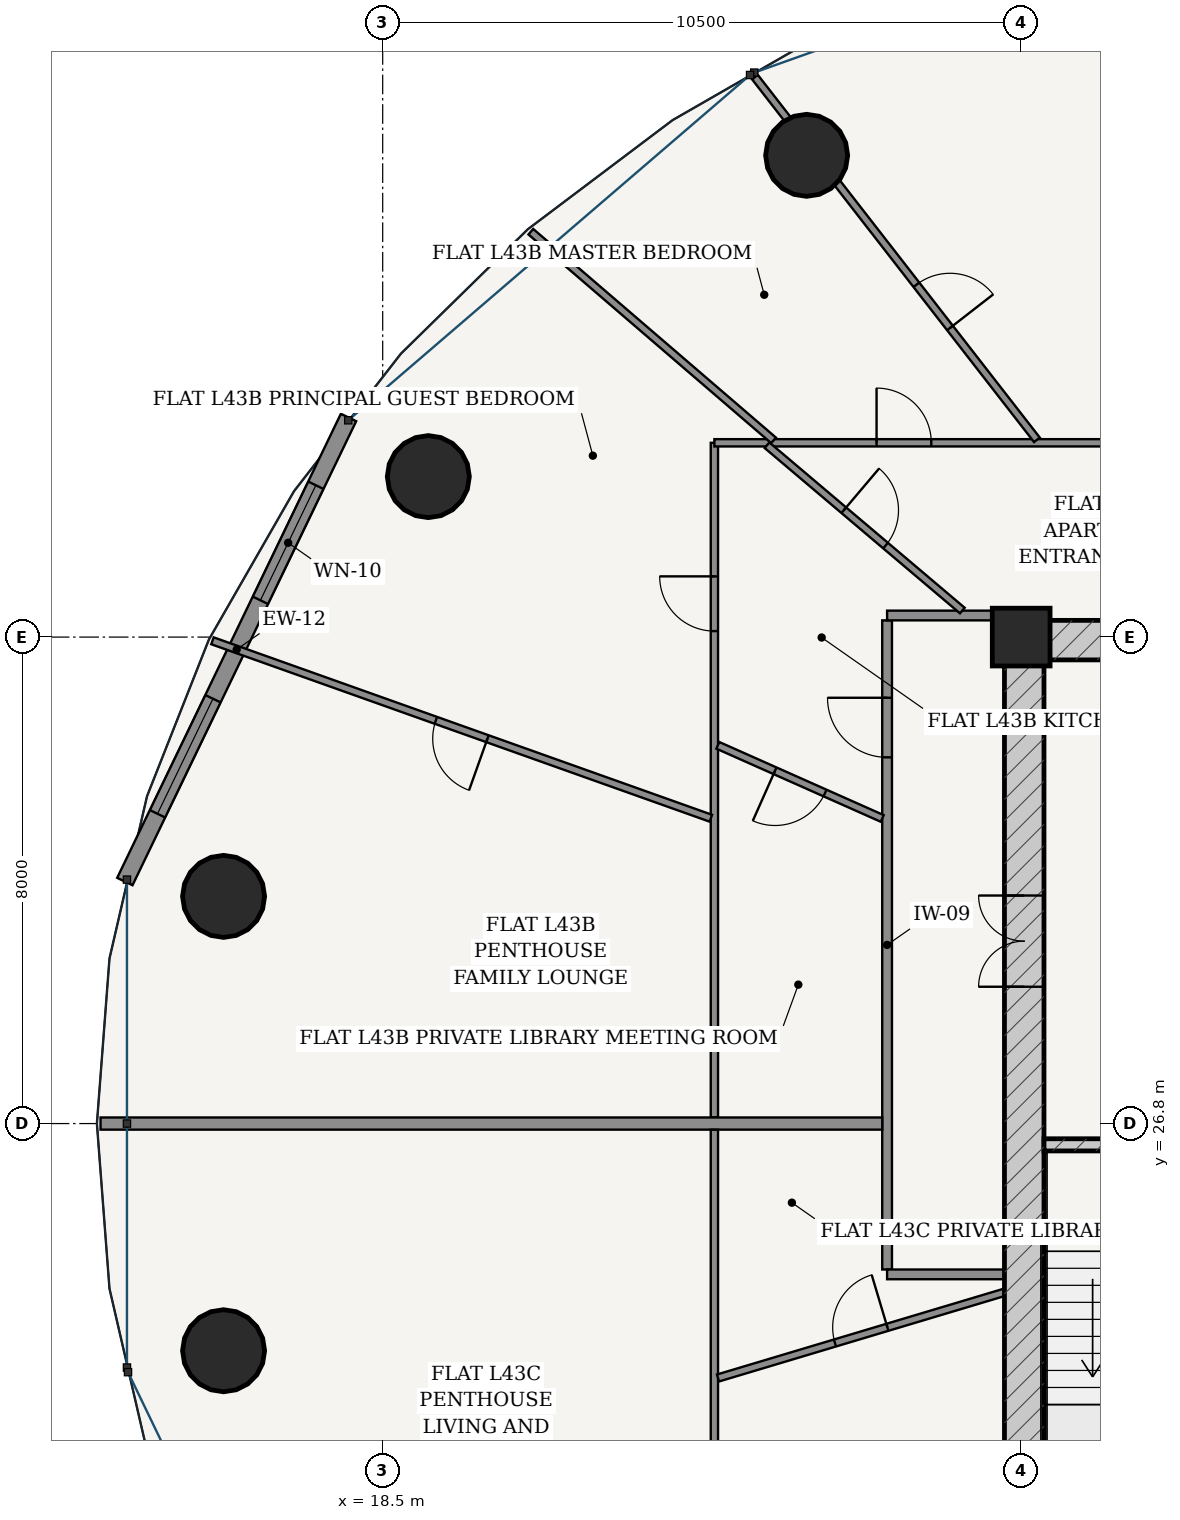
"""IFC4 building model, lengths in metres.
Left out: names, types, materials, properties, quantities, classifications, styles, units other than length and angle.
Written with IfcOpenShell. Run it as: python <this file> out.ifc"""

import sys

from ifc_helpers import new_model, si_unit, direction, frame, frame_2d, origin, origin_2d, place, context, subcontext, project, spatial, rectangle, hollow_circle, extrude, source, transform, mapped, element, fill, save


model = new_model("IFC4")
c1 = context("Model", 3, precision=1e-05, world=origin(), true_north=direction((-0.2419218956, 0.970295726276)))
c2 = subcontext(c1, "Body", "Model", "MODEL_VIEW")
j1 = project(units=[si_unit("LENGTHUNIT", "METRE"), si_unit("PLANEANGLEUNIT", "RADIAN")], contexts=[c1])
p1 = place(None, origin())
s1 = spatial("IfcSite", under=j1, at=p1, CompositionType="ELEMENT")
p2 = place(p1, origin())
s2 = spatial("IfcBuilding", under=s1, at=p2, CompositionType="ELEMENT")
p3 = place(p2, frame((0.0, 0.0, 164.2)))
s3 = spatial("IfcBuildingStorey", under=s2, at=p3, CompositionType="ELEMENT", Elevation=164.2)
p4 = place(p3, frame((29.0, 34.8, 0.0), z_axis=(0.0, 0.0, 1.0), x_axis=(1.0, 0.0, 0.0)))
e1 = element("IfcColumn", 1, at=p4, inside=s3, PredefinedType="COLUMN", context=c2, shape_type="SweptSolid", body=[
    extrude(rectangle(XDim=0.95, YDim=0.95, at=origin_2d()), origin(), (0.0, 0.0, 1.0), 3.6),
])
p5 = place(p3, frame((28.725, 34.75, 0.0), z_axis=(0.0, 0.0, 1.0), x_axis=(1.0, 0.0, 0.0)))
e2 = element("IfcWall", 2, at=p5, inside=s3, PredefinedType="SHEAR", context=c2, shape_type="SweptSolid", body=[
    extrude(rectangle(XDim=18.55, YDim=0.65, at=frame_2d((9.275, 0.0))), origin(), (0.0, 0.0, 1.0), 3.33),
])
p6 = place(p3, frame((29.05, 19.175, 0.0), z_axis=(0.0, 0.0, 1.0), x_axis=(0.0, 1.0, 0.0)))
e3 = element("IfcWall", 3, at=p6, inside=s3, PredefinedType="SHEAR", context=c2, shape_type="SweptSolid", body=[
    extrude(rectangle(XDim=15.25, YDim=0.65, at=frame_2d((7.625, 0.0))), origin(), (0.0, 0.0, 1.0), 3.33),
])
p7 = place(p6, frame((9.875, 0.0, 0.0)))
e4 = element("IfcOpeningElement", 4, at=p7, cuts=e3, PredefinedType="OPENING", context=c2, shape_type="SweptSolid", body=[
    extrude(rectangle(XDim=1.5, YDim=2.2, at=frame_2d((0.75, 1.1))), frame((0.0, 0.335, 0.0), z_axis=(0.0, -1.0, 0.0), x_axis=(1.0, 0.0, 0.0)), (0.0, 0.0, 1.0), 0.67),
])
p8 = place(p3, frame((29.375, 26.45, 0.0), z_axis=(0.0, 0.0, 1.0), x_axis=(1.0, 0.0, 0.0)))
e5 = element("IfcWall", 5, at=p8, inside=s3, PredefinedType="SOLIDWALL", context=c2, shape_type="SweptSolid", body=[
    extrude(rectangle(XDim=3.32, YDim=0.2, at=frame_2d((1.66, 0.0))), origin(), (0.0, 0.0, 1.0), 3.33),
])
p9 = place(p8, frame((1.185, 0.0, 0.0)))
e6 = element("IfcOpeningElement", 6, at=p9, cuts=e5, PredefinedType="OPENING", context=c2, shape_type="SweptSolid", body=[
    extrude(rectangle(XDim=0.95, YDim=2.15, at=frame_2d((0.475, 1.075))), frame((0.0, 0.11, 0.0), z_axis=(0.0, -1.0, 0.0), x_axis=(1.0, 0.0, 0.0)), (0.0, 0.0, 1.0), 0.22),
])
for number, where, z_axis, x_axis in (
    (7, (25.472, 42.723, 0.0), (0.0, 0.0, 1.0), (1.0, 0.0, 0.0)),
    (8, (19.25, 37.439, 0.0), (0.0, 0.0, 1.0), (1.0, 0.0, 0.0)),
    (9, (15.883, 30.536, 0.0), (0.0, 0.0, 1.0), (1.0, 0.0, 0.0)),
    (10, (15.883, 23.064, 0.0), (0.0, 0.0, 1.0), (1.0, 0.0, 0.0)),
):
    element("IfcColumn", number, at=place(p3, frame(where, z_axis=z_axis, x_axis=x_axis)), inside=s3, PredefinedType="COLUMN", context=c2, shape_type="SweptSolid", body=[
        extrude(hollow_circle(Radius=0.675, WallThickness=0.042, at=origin_2d()), origin(), (0.0, 0.0, 1.0), 3.6),
    ])
p10 = place(p3, frame((17.938, 38.411, 0.0), z_axis=(0.0, 0.0, 1.0), x_axis=(-0.434209827226, -0.900811759437, 0.0)))
e11 = element("IfcWall", 11, at=p10, inside=s3, PredefinedType="SOLIDWALL", context=c2, shape_type="SweptSolid", body=[
    extrude(rectangle(XDim=8.472, YDim=0.28, at=frame_2d((4.236, 0.0))), origin(), (0.0, 0.0, 1.0), 3.33),
])
p11 = place(p10, frame((1.237, 0.0, 0.85)))
e12 = element("IfcOpeningElement", 12, at=p11, cuts=e11, PredefinedType="OPENING", context=c2, shape_type="SweptSolid", body=[
    extrude(rectangle(XDim=2.1, YDim=1.95, at=frame_2d((1.05, 0.975))), frame((0.0, 0.15, 0.0), z_axis=(0.0, -1.0, 0.0), x_axis=(1.0, 0.0, 0.0)), (0.0, 0.0, 1.0), 0.3),
])
p12 = place(p10, frame((5.134, 0.0, 0.85)))
e13 = element("IfcOpeningElement", 13, at=p12, cuts=e11, PredefinedType="OPENING", context=c2, shape_type="SweptSolid", body=[
    extrude(rectangle(XDim=2.1, YDim=1.95, at=frame_2d((1.05, 0.975))), frame((0.0, 0.15, 0.0), z_axis=(0.0, -1.0, 0.0), x_axis=(1.0, 0.0, 0.0)), (0.0, 0.0, 1.0), 0.3),
])
p13 = place(p3, frame((26.795, 24.4, 0.0), z_axis=(0.0, 0.0, 1.0), x_axis=(0.0, 1.0, 0.0)))
e14 = element("IfcWall", 14, at=p13, inside=s3, PredefinedType="PARTITIONING", context=c2, shape_type="SweptSolid", body=[
    extrude(rectangle(XDim=10.675, YDim=0.16, at=frame_2d((5.337, 0.0))), origin(), (0.0, 0.0, 1.0), 2.776),
])
p14 = place(p13, frame((8.422, 0.0, 0.0)))
e15 = element("IfcOpeningElement", 15, at=p14, cuts=e14, PredefinedType="OPENING", context=c2, shape_type="SweptSolid", body=[
    extrude(rectangle(XDim=0.98, YDim=2.2, at=frame_2d((0.49, 1.1))), frame((0.0, 0.09, 0.0), z_axis=(0.0, -1.0, 0.0), x_axis=(1.0, 0.0, 0.0)), (0.0, 0.0, 1.0), 0.18),
])
p15 = place(p3, frame((26.795, 35.155, 0.0), z_axis=(0.0, 0.0, 1.0), x_axis=(1.0, 0.0, 0.0)))
e16 = element("IfcWall", 16, at=p15, inside=s3, PredefinedType="PARTITIONING", context=c2, shape_type="SweptSolid", body=[
    extrude(rectangle(XDim=1.93, YDim=0.16, at=frame_2d((0.965, 0.0))), origin(), (0.0, 0.0, 1.0), 2.776),
])
p16 = place(p3, frame((26.795, 24.32, 0.0), z_axis=(0.0, 0.0, 1.0), x_axis=(1.0, 0.0, 0.0)))
e17 = element("IfcWall", 17, at=p16, inside=s3, PredefinedType="PARTITIONING", context=c2, shape_type="SweptSolid", body=[
    extrude(rectangle(XDim=1.93, YDim=0.16, at=frame_2d((0.965, 0.0))), origin(), (0.0, 0.0, 1.0), 3.33),
])
p17 = place(p3, frame((23.955, 26.902, 0.0), z_axis=(0.0, 0.0, 1.0), x_axis=(0.0, 1.0, 0.0)))
e18 = element("IfcWall", 18, at=p17, inside=s3, PredefinedType="PARTITIONING", context=c2, shape_type="SweptSolid", body=[
    extrude(rectangle(XDim=11.093, YDim=0.12, at=frame_2d((5.546, 0.0))), origin(), (0.0, 0.0, 1.0), 2.776),
])
p18 = place(p17, frame((7.997, 0.0, 0.0)))
e19 = element("IfcOpeningElement", 19, at=p18, cuts=e18, PredefinedType="OPENING", context=c2, shape_type="SweptSolid", body=[
    extrude(rectangle(XDim=0.9, YDim=2.15, at=frame_2d((0.45, 1.075))), frame((0.0, 0.07, 0.0), z_axis=(0.0, -1.0, 0.0), x_axis=(1.0, 0.0, 0.0)), (0.0, 0.0, 1.0), 0.14),
])
p19 = place(p3, frame((23.955, 37.995, 0.0), z_axis=(0.0, 0.0, 1.0), x_axis=(1.0, 0.0, 0.0)))
e20 = element("IfcWall", 20, at=p19, inside=s3, PredefinedType="PARTITIONING", context=c2, shape_type="SweptSolid", body=[
    extrude(rectangle(XDim=7.69, YDim=0.12, at=frame_2d((3.845, 0.0))), origin(), (0.0, 0.0, 1.0), 2.776),
])
p20 = place(p19, frame((2.667, 0.0, 0.0)))
e21 = element("IfcOpeningElement", 21, at=p20, cuts=e20, PredefinedType="OPENING", context=c2, shape_type="SweptSolid", body=[
    extrude(rectangle(XDim=0.9, YDim=2.15, at=frame_2d((0.45, 1.075))), frame((0.0, 0.07, 0.0), z_axis=(0.0, -1.0, 0.0), x_axis=(1.0, 0.0, 0.0)), (0.0, 0.0, 1.0), 0.14),
])
p21 = place(p3, frame((29.259, 38.044, 0.0), z_axis=(0.0, 0.0, 1.0), x_axis=(-0.613770587295, 0.789484430607, 0.0)))
e22 = element("IfcWall", 22, at=p21, inside=s3, PredefinedType="PARTITIONING", context=c2, shape_type="SweptSolid", body=[
    extrude(rectangle(XDim=7.556, YDim=0.12, at=frame_2d((3.778, 0.0))), origin(), (0.0, 0.0, 1.0), 2.776),
])
p22 = place(p21, frame((2.33, 0.0, 0.0)))
e23 = element("IfcOpeningElement", 23, at=p22, cuts=e22, PredefinedType="OPENING", context=c2, shape_type="SweptSolid", body=[
    extrude(rectangle(XDim=0.9, YDim=2.15, at=frame_2d((0.45, 1.075))), frame((0.0, 0.07, 0.0), z_axis=(0.0, -1.0, 0.0), x_axis=(1.0, 0.0, 0.0)), (0.0, 0.0, 1.0), 0.14),
])
p23 = place(p3, frame((24.928, 38.035, 0.0), z_axis=(0.0, 0.0, 1.0), x_axis=(-0.758368609512, 0.65182593697, 0.0)))
e24 = element("IfcWall", 24, at=p23, inside=s3, PredefinedType="PARTITIONING", context=c2, shape_type="SweptSolid", body=[
    extrude(rectangle(XDim=5.263, YDim=0.12, at=frame_2d((2.632, 0.0))), origin(), (0.0, 0.0, 1.0), 2.846),
])
p24 = place(p3, frame((23.896, 31.821, 0.0), z_axis=(0.0, 0.0, 1.0), x_axis=(-0.942072876428, 0.335408251983, 0.0)))
e25 = element("IfcWall", 25, at=p24, inside=s3, PredefinedType="PARTITIONING", context=c2, shape_type="SweptSolid", body=[
    extrude(rectangle(XDim=8.7, YDim=0.12, at=frame_2d((4.35, 0.0))), origin(), (0.0, 0.0, 1.0), 2.846),
])
p25 = place(p24, frame((3.9, 0.0, 0.0)))
e26 = element("IfcOpeningElement", 26, at=p25, cuts=e25, PredefinedType="OPENING", context=c2, shape_type="SweptSolid", body=[
    extrude(rectangle(XDim=0.9, YDim=2.15, at=frame_2d((0.45, 1.075))), frame((0.0, 0.07, 0.0), z_axis=(0.0, -1.0, 0.0), x_axis=(1.0, 0.0, 0.0)), (0.0, 0.0, 1.0), 0.14),
])
p26 = place(p3, frame((28.032, 35.236, 0.0), z_axis=(0.0, 0.0, 1.0), x_axis=(-0.763324664245, 0.646015059388, 0.0)))
e27 = element("IfcWall", 27, at=p26, inside=s3, PredefinedType="PARTITIONING", context=c2, shape_type="SweptSolid", body=[
    extrude(rectangle(XDim=4.208, YDim=0.12, at=frame_2d((2.104, 0.0))), origin(), (0.0, 0.0, 1.0), 3.005),
])
p27 = place(p26, frame((1.654, 0.0, 0.0)))
e28 = element("IfcOpeningElement", 28, at=p27, cuts=e27, PredefinedType="OPENING", context=c2, shape_type="SweptSolid", body=[
    extrude(rectangle(XDim=0.9, YDim=2.15, at=frame_2d((0.45, 1.075))), frame((0.0, 0.07, 0.0), z_axis=(0.0, -1.0, 0.0), x_axis=(1.0, 0.0, 0.0)), (0.0, 0.0, 1.0), 0.14),
])
p28 = place(p3, frame((26.715, 31.818, 0.0), z_axis=(0.0, 0.0, 1.0), x_axis=(-0.91376049718, 0.406253312347, 0.0)))
e29 = element("IfcWall", 29, at=p28, inside=s3, PredefinedType="PARTITIONING", context=c2, shape_type="SweptSolid", body=[
    extrude(rectangle(XDim=2.958, YDim=0.12, at=frame_2d((1.479, 0.0))), origin(), (0.0, 0.0, 1.0), 3.33),
])
p29 = place(p28, frame((1.029, 0.0, 0.0)))
e30 = element("IfcOpeningElement", 30, at=p29, cuts=e29, PredefinedType="OPENING", context=c2, shape_type="SweptSolid", body=[
    extrude(rectangle(XDim=0.9, YDim=2.15, at=frame_2d((0.45, 1.075))), frame((0.0, 0.07, 0.0), z_axis=(0.0, -1.0, 0.0), x_axis=(1.0, 0.0, 0.0)), (0.0, 0.0, 1.0), 0.14),
])
p30 = place(p3, frame((26.715, 26.8, 0.0), z_axis=(0.0, 0.0, 1.0), x_axis=(-1.0, 0.0, 0.0)))
e31 = element("IfcWall", 31, at=p30, inside=s3, PredefinedType="PARTITIONING", context=c2, shape_type="SweptSolid", body=[
    extrude(rectangle(XDim=12.855, YDim=0.2, at=frame_2d((6.427, 0.0))), origin(), (0.0, 0.0, 1.0), 2.846),
])
p31 = place(p3, frame((23.955, 21.48, 0.0), z_axis=(0.0, 0.0, 1.0), x_axis=(0.0, 1.0, 0.0)))
e32 = element("IfcWall", 32, at=p31, inside=s3, PredefinedType="PARTITIONING", context=c2, shape_type="SweptSolid", body=[
    extrude(rectangle(XDim=5.218, YDim=0.12, at=frame_2d((2.609, 0.0))), origin(), (0.0, 0.0, 1.0), 2.776),
])
p32 = place(p3, frame((28.723, 24.025, 0.0), z_axis=(0.0, 0.0, 1.0), x_axis=(-0.958046115523, -0.286614096882, 0.0)))
e33 = element("IfcWall", 33, at=p32, inside=s3, PredefinedType="PARTITIONING", context=c2, shape_type="SweptSolid", body=[
    extrude(rectangle(XDim=4.915, YDim=0.12, at=frame_2d((2.458, 0.0))), origin(), (0.0, 0.0, 1.0), 3.33),
])
p33 = place(p32, frame((2.007, 0.0, 0.0)))
e34 = element("IfcOpeningElement", 34, at=p33, cuts=e33, PredefinedType="OPENING", context=c2, shape_type="SweptSolid", body=[
    extrude(rectangle(XDim=0.9, YDim=2.15, at=frame_2d((0.45, 1.075))), frame((0.0, 0.07, 0.0), z_axis=(0.0, -1.0, 0.0), x_axis=(1.0, 0.0, 0.0)), (0.0, 0.0, 1.0), 0.14),
])
m1 = source(origin(), c2, "Body", "SweptSolid", [
    extrude(rectangle(XDim=2.1, YDim=1.95, at=frame_2d((1.05, 0.975))), frame((0.0, 0.03, 0.0), z_axis=(0.0, -1.0, 0.0), x_axis=(1.0, 0.0, 0.0)), (0.0, 0.0, 1.0), 0.06),
])
p34 = place(p11, origin())
e35 = element("IfcWindow", 35, at=p34, inside=s3, PartitioningType="SINGLE_PANEL", PredefinedType="WINDOW", context=c2, shape_type="MappedRepresentation", body=[
    mapped(m1, transform((0.0, 0.0, 0.0), scale=1.0)),
])
fill(e12, e35)
p35 = place(p12, origin())
e36 = element("IfcWindow", 36, at=p35, inside=s3, PartitioningType="SINGLE_PANEL", PredefinedType="WINDOW", context=c2, shape_type="MappedRepresentation", body=[
    mapped(m1, transform((0.0, 0.0, 0.0), scale=1.0)),
])
fill(e13, e36)
m2 = source(origin(), c2, "Body", "SweptSolid", [
    extrude(rectangle(XDim=1.5, YDim=2.2, at=frame_2d((0.75, 1.1))), frame((0.0, 0.025, 0.0), z_axis=(0.0, -1.0, 0.0), x_axis=(1.0, 0.0, 0.0)), (0.0, 0.0, 1.0), 0.05),
])
p36 = place(p7, origin())
e37 = element("IfcDoor", 37, at=p36, inside=s3, OperationType="DOUBLE_DOOR_SINGLE_SWING", PredefinedType="DOOR", context=c2, shape_type="MappedRepresentation", body=[
    mapped(m2, transform((0.0, 0.0, 0.0), scale=1.0)),
])
fill(e4, e37)
m3 = source(origin(), c2, "Body", "SweptSolid", [
    extrude(rectangle(XDim=0.98, YDim=2.2, at=frame_2d((0.49, 1.1))), frame((0.0, 0.025, 0.0), z_axis=(0.0, -1.0, 0.0), x_axis=(1.0, 0.0, 0.0)), (0.0, 0.0, 1.0), 0.05),
])
p37 = place(p14, origin())
e38 = element("IfcDoor", 38, at=p37, inside=s3, OperationType="SINGLE_SWING_RIGHT", PredefinedType="DOOR", context=c2, shape_type="MappedRepresentation", body=[
    mapped(m3, transform((0.0, 0.0, 0.0), scale=1.0)),
])
fill(e15, e38)
m4 = source(origin(), c2, "Body", "SweptSolid", [
    extrude(rectangle(XDim=0.9, YDim=2.15, at=frame_2d((0.45, 1.075))), frame((0.0, 0.025, 0.0), z_axis=(0.0, -1.0, 0.0), x_axis=(1.0, 0.0, 0.0)), (0.0, 0.0, 1.0), 0.05),
])
p38 = place(p27, frame((0.9, 0.0, 0.0), z_axis=(0.0, 0.0, 1.0), x_axis=(-1.0, 0.0, 0.0)))
e39 = element("IfcDoor", 39, at=p38, inside=s3, OperationType="SINGLE_SWING_LEFT", PredefinedType="DOOR", context=c2, shape_type="MappedRepresentation", body=[
    mapped(m4, transform((0.0, 0.0, 0.0), scale=1.0)),
])
fill(e28, e39)
p39 = place(p29, origin())
e40 = element("IfcDoor", 40, at=p39, inside=s3, OperationType="SINGLE_SWING_RIGHT", PredefinedType="DOOR", context=c2, shape_type="MappedRepresentation", body=[
    mapped(m4, transform((0.0, 0.0, 0.0), scale=1.0)),
])
fill(e30, e40)
p40 = place(p20, origin())
e41 = element("IfcDoor", 41, at=p40, inside=s3, OperationType="SINGLE_SWING_LEFT", PredefinedType="DOOR", context=c2, shape_type="MappedRepresentation", body=[
    mapped(m4, transform((0.0, 0.0, 0.0), scale=1.0)),
])
fill(e21, e41)
p41 = place(p18, origin())
e42 = element("IfcDoor", 42, at=p41, inside=s3, OperationType="SINGLE_SWING_RIGHT", PredefinedType="DOOR", context=c2, shape_type="MappedRepresentation", body=[
    mapped(m4, transform((0.0, 0.0, 0.0), scale=1.0)),
])
fill(e19, e42)
p42 = place(p22, frame((0.9, 0.0, 0.0), z_axis=(0.0, 0.0, 1.0), x_axis=(-1.0, 0.0, 0.0)))
e43 = element("IfcDoor", 43, at=p42, inside=s3, OperationType="SINGLE_SWING_RIGHT", PredefinedType="DOOR", context=c2, shape_type="MappedRepresentation", body=[
    mapped(m4, transform((0.0, 0.0, 0.0), scale=1.0)),
])
fill(e23, e43)
p43 = place(p25, origin())
e44 = element("IfcDoor", 44, at=p43, inside=s3, OperationType="SINGLE_SWING_LEFT", PredefinedType="DOOR", context=c2, shape_type="MappedRepresentation", body=[
    mapped(m4, transform((0.0, 0.0, 0.0), scale=1.0)),
])
fill(e26, e44)
p44 = place(p33, frame((0.9, 0.0, 0.0), z_axis=(0.0, 0.0, 1.0), x_axis=(-1.0, 0.0, 0.0)))
e45 = element("IfcDoor", 45, at=p44, inside=s3, OperationType="SINGLE_SWING_RIGHT", PredefinedType="DOOR", context=c2, shape_type="MappedRepresentation", body=[
    mapped(m4, transform((0.0, 0.0, 0.0), scale=1.0)),
])
fill(e34, e45)
save(model, sys.argv[1])
